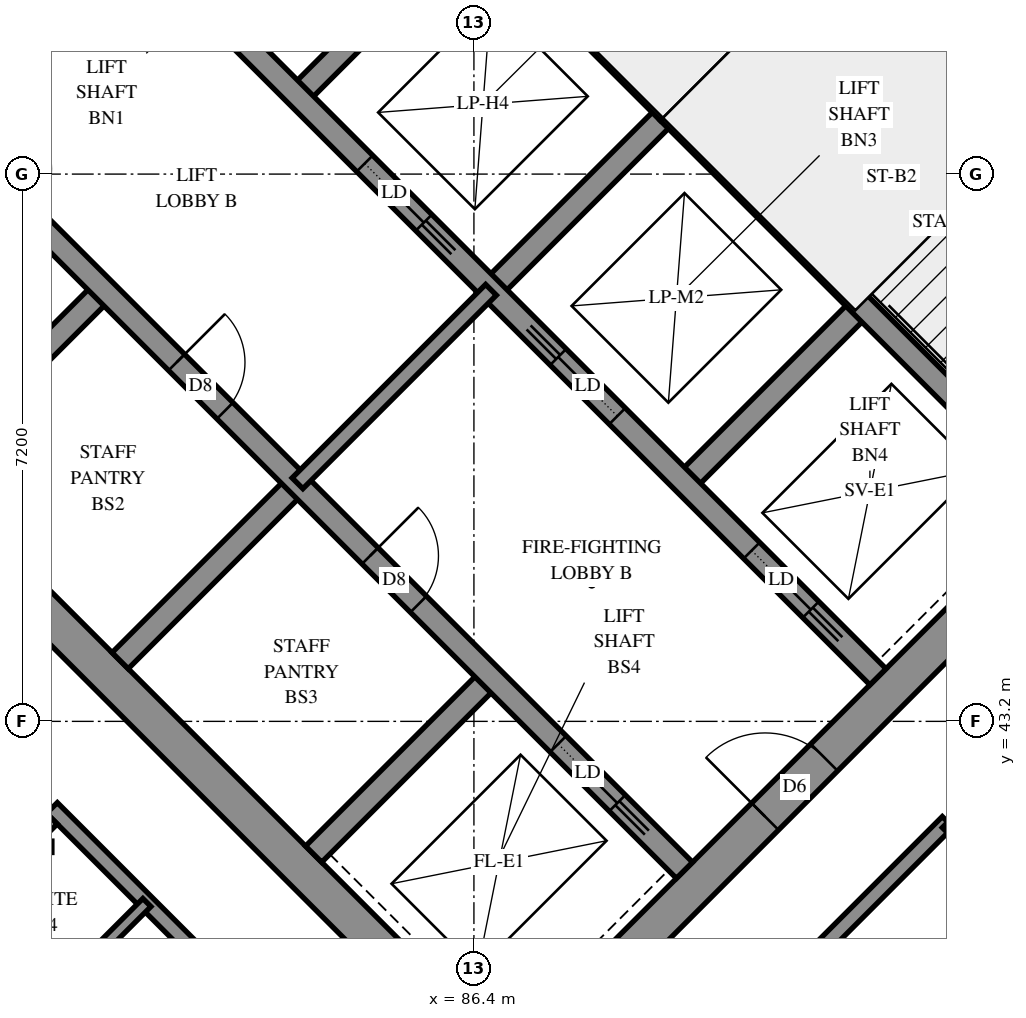
"""IFC4 building model, lengths in metres.
Left out: names, types, materials, properties, quantities, classifications, styles, units other than length and angle.
Written with IfcOpenShell. Run it as: python <this file> out.ifc"""

import sys

from ifc_helpers import new_model, si_unit, direction, frame, frame_2d, origin, place, context, subcontext, project, spatial, rectangle, extrude, element, fill, save


model = new_model("IFC4")
c1 = context("Model", 3, precision=1e-05, world=origin(), true_north=direction((0.0, 1.0)))
c2 = subcontext(c1, "Body", "Model", "MODEL_VIEW")
j1 = project(units=[si_unit("LENGTHUNIT", "METRE"), si_unit("PLANEANGLEUNIT", "RADIAN")], contexts=[c1])
p1 = place(None, origin())
s1 = spatial("IfcSite", under=j1, at=p1, CompositionType="ELEMENT")
p2 = place(p1, origin())
s2 = spatial("IfcBuilding", under=s1, at=p2, CompositionType="ELEMENT")
p3 = place(p2, frame((0.0, 0.0, 210.0)))
s3 = spatial("IfcBuildingStorey", under=s2, at=p3, CompositionType="ELEMENT", Elevation=210.0)
p4 = place(p3, frame((76.124, 49.267, -0.3), z_axis=(0.0, 0.0, 1.0), x_axis=(0.7071067812, -0.7071067812, 0.0)))
e1 = element("IfcWall", 1, at=p4, inside=s3, PredefinedType="SHEAR", context=c2, shape_type="SweptSolid", body=[
    extrude(rectangle(XDim=15.4, YDim=0.5, at=frame_2d((7.7, 0.0))), origin(), (0.0, 0.0, 1.0), 2.7),
])
p5 = place(p3, frame((86.66, 59.802, -0.3), z_axis=(0.0, 0.0, 1.0), x_axis=(0.7071067812, -0.7071067812, 0.0)))
e2 = element("IfcWall", 2, at=p5, inside=s3, PredefinedType="SHEAR", context=c2, shape_type="SweptSolid", body=[
    extrude(rectangle(XDim=15.4, YDim=0.5, at=frame_2d((7.7, 0.0))), origin(), (0.0, 0.0, 1.0), 2.7),
])
p6 = place(p5, frame((10.5, 0.0, 0.3)))
e3 = element("IfcOpeningElement", 3, at=p6, cuts=e2, PredefinedType="OPENING", context=c2, shape_type="SweptSolid", body=[
    extrude(rectangle(XDim=0.8, YDim=2.1, at=frame_2d((0.4, 1.05))), frame((0.0, 0.26, 0.0), z_axis=(0.0, -1.0, 0.0), x_axis=(1.0, 0.0, 0.0)), (0.0, 0.0, 1.0), 0.52),
])
p7 = place(p3, frame((76.478, 49.267, -0.3), z_axis=(0.0, 0.0, 1.0), x_axis=(0.7071067812, 0.7071067812, 0.0)))
e4 = element("IfcWall", 4, at=p7, inside=s3, PredefinedType="SHEAR", context=c2, shape_type="SweptSolid", body=[
    extrude(rectangle(XDim=14.4, YDim=0.5, at=frame_2d((7.2, 0.0))), origin(), (0.0, 0.0, 1.0), 2.7),
])
p8 = place(p7, frame((4.55, 0.0, 0.3)))
e5 = element("IfcOpeningElement", 5, at=p8, cuts=e4, PredefinedType="OPENING", context=c2, shape_type="SweptSolid", body=[
    extrude(rectangle(XDim=1.1, YDim=2.1, at=frame_2d((0.55, 1.05))), frame((0.0, 0.26, 0.0), z_axis=(0.0, -1.0, 0.0), x_axis=(1.0, 0.0, 0.0)), (0.0, 0.0, 1.0), 0.52),
])
p9 = place(p7, frame((11.35, 0.0, 0.3)))
e6 = element("IfcOpeningElement", 6, at=p9, cuts=e4, PredefinedType="OPENING", context=c2, shape_type="SweptSolid", body=[
    extrude(rectangle(XDim=1.1, YDim=2.1, at=frame_2d((0.55, 1.05))), frame((0.0, 0.26, 0.0), z_axis=(0.0, -1.0, 0.0), x_axis=(1.0, 0.0, 0.0)), (0.0, 0.0, 1.0), 0.52),
])
p10 = place(p3, frame((87.013, 38.731, -0.3), z_axis=(0.0, 0.0, 1.0), x_axis=(0.7071067812, 0.7071067812, 0.0)))
e7 = element("IfcWall", 7, at=p10, inside=s3, PredefinedType="SHEAR", context=c2, shape_type="SweptSolid", body=[
    extrude(rectangle(XDim=14.4, YDim=0.5, at=frame_2d((7.2, 0.0))), origin(), (0.0, 0.0, 1.0), 2.7),
])
p11 = place(p10, frame((4.55, 0.0, 0.3)))
e8 = element("IfcOpeningElement", 8, at=p11, cuts=e7, PredefinedType="OPENING", context=c2, shape_type="SweptSolid", body=[
    extrude(rectangle(XDim=1.1, YDim=2.1, at=frame_2d((0.55, 1.05))), frame((0.0, 0.26, 0.0), z_axis=(0.0, -1.0, 0.0), x_axis=(1.0, 0.0, 0.0)), (0.0, 0.0, 1.0), 0.52),
])
p12 = place(p10, frame((11.35, 0.0, 0.3)))
e9 = element("IfcOpeningElement", 9, at=p12, cuts=e7, PredefinedType="OPENING", context=c2, shape_type="SweptSolid", body=[
    extrude(rectangle(XDim=1.1, YDim=2.1, at=frame_2d((0.55, 1.05))), frame((0.0, 0.26, 0.0), z_axis=(0.0, -1.0, 0.0), x_axis=(1.0, 0.0, 0.0)), (0.0, 0.0, 1.0), 0.52),
])
for number, where, z_axis, x_axis in (
    (10, (79.2, 46.544, 0.0), (0.0, 0.0, 1.0), (0.707, 0.707, 0.0)),
    (11, (84.079, 51.423, 0.0), (0.0, 0.0, 1.0), (0.707, 0.707, 0.0)),
):
    element("IfcWall", number, at=place(p3, frame(where, z_axis=z_axis, x_axis=x_axis)), inside=s3, PredefinedType="SOLIDWALL", context=c2, shape_type="SweptSolid", body=[
        extrude(rectangle(XDim=3.3, YDim=0.3, at=frame_2d((1.65, 0.0))), origin(), (0.0, 0.0, 1.0), 3.1),
    ])
p13 = place(p3, frame((81.746, 43.999, 0.0), z_axis=(0.0, 0.0, 1.0), x_axis=(0.7071067812, 0.7071067812, 0.0)))
e12 = element("IfcWall", 12, at=p13, inside=s3, PredefinedType="SOLIDWALL", context=c2, shape_type="SweptSolid", body=[
    extrude(rectangle(XDim=3.3, YDim=0.3, at=frame_2d((1.65, 0.0))), origin(), (0.0, 0.0, 1.0), 3.1),
])
p14 = place(p3, frame((86.625, 48.878, 0.0), z_axis=(0.0, 0.0, 1.0), x_axis=(0.7071067812, 0.7071067812, 0.0)))
e13 = element("IfcWall", 13, at=p14, inside=s3, PredefinedType="SOLIDWALL", context=c2, shape_type="SweptSolid", body=[
    extrude(rectangle(XDim=3.3, YDim=0.3, at=frame_2d((1.65, 0.0))), origin(), (0.0, 0.0, 1.0), 3.1),
])
p15 = place(p3, frame((84.291, 41.453, 0.0), z_axis=(0.0, 0.0, 1.0), x_axis=(0.7071067812, 0.7071067812, 0.0)))
e14 = element("IfcWall", 14, at=p15, inside=s3, PredefinedType="SOLIDWALL", context=c2, shape_type="SweptSolid", body=[
    extrude(rectangle(XDim=3.3, YDim=0.3, at=frame_2d((1.65, 0.0))), origin(), (0.0, 0.0, 1.0), 3.1),
])
p16 = place(p3, frame((89.17, 46.332, 0.0), z_axis=(0.0, 0.0, 1.0), x_axis=(0.7071067812, 0.7071067812, 0.0)))
e15 = element("IfcWall", 15, at=p16, inside=s3, PredefinedType="SOLIDWALL", context=c2, shape_type="SweptSolid", body=[
    extrude(rectangle(XDim=3.3, YDim=0.3, at=frame_2d((1.65, 0.0))), origin(), (0.0, 0.0, 1.0), 3.1),
])
p17 = place(p3, frame((78.988, 51.423, 0.0), z_axis=(0.0, 0.0, 1.0), x_axis=(0.7071067812, -0.7071067812, 0.0)))
e16 = element("IfcWall", 16, at=p17, inside=s3, PredefinedType="SOLIDWALL", context=c2, shape_type="SweptSolid", body=[
    extrude(rectangle(XDim=14.4, YDim=0.3, at=frame_2d((7.2, 0.0))), origin(), (0.0, 0.0, 1.0), 3.1),
])
p18 = place(p17, frame((1.35, 0.0, 0.0)))
e17 = element("IfcOpeningElement", 17, at=p18, cuts=e16, PredefinedType="OPENING", context=c2, shape_type="SweptSolid", body=[
    extrude(rectangle(XDim=0.9, YDim=2.1, at=frame_2d((0.45, 1.05))), frame((0.0, 0.16, 0.0), z_axis=(0.0, -1.0, 0.0), x_axis=(1.0, 0.0, 0.0)), (0.0, 0.0, 1.0), 0.32),
])
p19 = place(p17, frame((4.95, 0.0, 0.0)))
e18 = element("IfcOpeningElement", 18, at=p19, cuts=e16, PredefinedType="OPENING", context=c2, shape_type="SweptSolid", body=[
    extrude(rectangle(XDim=0.9, YDim=2.1, at=frame_2d((0.45, 1.05))), frame((0.0, 0.16, 0.0), z_axis=(0.0, -1.0, 0.0), x_axis=(1.0, 0.0, 0.0)), (0.0, 0.0, 1.0), 0.32),
])
p20 = place(p17, frame((8.55, 0.0, 0.0)))
e19 = element("IfcOpeningElement", 19, at=p20, cuts=e16, PredefinedType="OPENING", context=c2, shape_type="SweptSolid", body=[
    extrude(rectangle(XDim=0.9, YDim=2.1, at=frame_2d((0.45, 1.05))), frame((0.0, 0.16, 0.0), z_axis=(0.0, -1.0, 0.0), x_axis=(1.0, 0.0, 0.0)), (0.0, 0.0, 1.0), 0.32),
])
p21 = place(p17, frame((12.05, 0.0, 0.0)))
e20 = element("IfcOpeningElement", 20, at=p21, cuts=e16, PredefinedType="OPENING", context=c2, shape_type="SweptSolid", body=[
    extrude(rectangle(XDim=1.1, YDim=2.1, at=frame_2d((0.55, 1.05))), frame((0.0, 0.16, 0.0), z_axis=(0.0, -1.0, 0.0), x_axis=(1.0, 0.0, 0.0)), (0.0, 0.0, 1.0), 0.32),
])
p22 = place(p3, frame((81.534, 53.969, 0.0), z_axis=(0.0, 0.0, 1.0), x_axis=(0.707103309, -0.7071102534, 0.0)))
e21 = element("IfcWall", 21, at=p22, inside=s3, PredefinedType="SOLIDWALL", context=c2, shape_type="SweptSolid", body=[
    extrude(rectangle(XDim=14.4, YDim=0.3, at=frame_2d((7.2, 0.0))), origin(), (0.0, 0.0, 1.0), 3.1),
])
p23 = place(p22, frame((1.25, 0.0, 0.0)))
e22 = element("IfcOpeningElement", 22, at=p23, cuts=e21, PredefinedType="OPENING", context=c2, shape_type="SweptSolid", body=[
    extrude(rectangle(XDim=1.1, YDim=2.1, at=frame_2d((0.55, 1.05))), frame((0.0, 0.16, 0.0), z_axis=(0.0, -1.0, 0.0), x_axis=(1.0, 0.0, 0.0)), (0.0, 0.0, 1.0), 0.32),
])
p24 = place(p22, frame((4.85, 0.0, 0.0)))
e23 = element("IfcOpeningElement", 23, at=p24, cuts=e21, PredefinedType="OPENING", context=c2, shape_type="SweptSolid", body=[
    extrude(rectangle(XDim=1.1, YDim=2.1, at=frame_2d((0.55, 1.05))), frame((0.0, 0.16, 0.0), z_axis=(0.0, -1.0, 0.0), x_axis=(1.0, 0.0, 0.0)), (0.0, 0.0, 1.0), 0.32),
])
p25 = place(p22, frame((8.45, 0.0, 0.0)))
e24 = element("IfcOpeningElement", 24, at=p25, cuts=e21, PredefinedType="OPENING", context=c2, shape_type="SweptSolid", body=[
    extrude(rectangle(XDim=1.1, YDim=2.1, at=frame_2d((0.55, 1.05))), frame((0.0, 0.16, 0.0), z_axis=(0.0, -1.0, 0.0), x_axis=(1.0, 0.0, 0.0)), (0.0, 0.0, 1.0), 0.32),
])
p26 = place(p22, frame((12.05, 0.0, 0.0)))
e25 = element("IfcOpeningElement", 25, at=p26, cuts=e21, PredefinedType="OPENING", context=c2, shape_type="SweptSolid", body=[
    extrude(rectangle(XDim=1.1, YDim=2.1, at=frame_2d((0.55, 1.05))), frame((0.0, 0.16, 0.0), z_axis=(0.0, -1.0, 0.0), x_axis=(1.0, 0.0, 0.0)), (0.0, 0.0, 1.0), 0.32),
])
for number, where, z_axis, x_axis in (
    (26, (83.867, 56.302, 0.0), (0.0, 0.0, 1.0), (0.707, -0.707, 0.0)),
    (27, (88.958, 51.211, 0.0), (0.0, 0.0, 1.0), (0.707, -0.707, 0.0)),
):
    element("IfcWall", number, at=place(p3, frame(where, z_axis=z_axis, x_axis=x_axis)), inside=s3, PredefinedType="SOLIDWALL", context=c2, shape_type="SweptSolid", body=[
        extrude(rectangle(XDim=7.2, YDim=0.3, at=frame_2d((3.6, 0.0))), origin(), (0.0, 0.0, 1.0), 3.1),
    ])
p27 = place(p3, frame((88.958, 51.211, 0.0), z_axis=(0.0, 0.0, 1.0), x_axis=(0.7071067812, 0.7071067812, 0.0)))
e28 = element("IfcWall", 28, at=p27, inside=s3, PredefinedType="SOLIDWALL", context=c2, shape_type="SweptSolid", body=[
    extrude(rectangle(XDim=4.2, YDim=0.3, at=frame_2d((2.1, 0.0))), origin(), (0.0, 0.0, 1.0), 3.1),
])
p28 = place(p3, frame((91.313, 53.354, 0.0), z_axis=(0.0, 0.0, 1.0), x_axis=(0.7071140275, -0.7070995348, 0.0)))
e29 = element("IfcWall", 29, at=p28, inside=s3, PredefinedType="PARTITIONING", context=c2, shape_type="SweptSolid", body=[
    extrude(rectangle(XDim=6.9, YDim=0.15, at=frame_2d((3.45, 0.0))), origin(), (0.0, 0.0, 1.0), 3.1),
])
p29 = place(p3, frame((84.079, 46.332, 0.0), z_axis=(0.0, 0.0, 1.0), x_axis=(0.7071067812, 0.7071067812, 0.0)))
e30 = element("IfcWall", 30, at=p29, inside=s3, PredefinedType="PARTITIONING", context=c2, shape_type="SweptSolid", body=[
    extrude(rectangle(XDim=3.6, YDim=0.2, at=frame_2d((1.8, 0.0))), origin(), (0.0, 0.0, 1.0), 3.1),
])
p30 = place(p3, frame((86.835, 36.079, 0.0), z_axis=(0.0, 0.0, 1.0), x_axis=(0.7071067812, 0.7071067812, 0.0)))
e31 = element("IfcWall", 31, at=p30, inside=s3, PredefinedType="PARTITIONING", context=c2, shape_type="SweptSolid", body=[
    extrude(rectangle(XDim=8.2, YDim=0.2, at=frame_2d((4.1, 0.0))), origin(), (0.0, 0.0, 1.0), 3.1),
])
p31 = place(p3, frame((80.849, 42.061, 0.0), z_axis=(0.0, 0.0, 1.0), x_axis=(0.7071067812, -0.7071067812, 0.0)))
e32 = element("IfcWall", 32, at=p31, inside=s3, PredefinedType="PARTITIONING", context=c2, shape_type="SweptSolid", body=[
    extrude(rectangle(XDim=6.964, YDim=0.2, at=frame_2d((3.482, 0.0))), origin(), (0.0, 0.0, 1.0), 3.1),
])
p32 = place(p31, frame((5.159, 0.0, 0.0)))
e33 = element("IfcOpeningElement", 33, at=p32, cuts=e32, PredefinedType="OPENING", context=c2, shape_type="SweptSolid", body=[
    extrude(rectangle(XDim=0.9, YDim=2.1, at=frame_2d((0.45, 1.05))), frame((0.0, 0.11, 0.0), z_axis=(0.0, -1.0, 0.0), x_axis=(1.0, 0.0, 0.0)), (0.0, 0.0, 1.0), 0.22),
])
p33 = place(p3, frame((92.633, 41.873, 0.0), z_axis=(0.0, 0.0, 1.0), x_axis=(0.7071067812, -0.7071067812, 0.0)))
e34 = element("IfcWall", 34, at=p33, inside=s3, PredefinedType="PARTITIONING", context=c2, shape_type="SweptSolid", body=[
    extrude(rectangle(XDim=5.199, YDim=0.2, at=frame_2d((2.599, 0.0))), origin(), (0.0, 0.0, 1.0), 3.1),
])
p34 = place(p33, frame((0.253, 0.0, 0.0)))
e35 = element("IfcOpeningElement", 35, at=p34, cuts=e34, PredefinedType="OPENING", context=c2, shape_type="SweptSolid", body=[
    extrude(rectangle(XDim=1.0, YDim=2.1, at=frame_2d((0.5, 1.05))), frame((0.0, 0.11, 0.0), z_axis=(0.0, -1.0, 0.0), x_axis=(1.0, 0.0, 0.0)), (0.0, 0.0, 1.0), 0.22),
])
p35 = place(p33, frame((3.948, 0.0, 0.0)))
e36 = element("IfcOpeningElement", 36, at=p35, cuts=e34, PredefinedType="OPENING", context=c2, shape_type="SweptSolid", body=[
    extrude(rectangle(XDim=0.9, YDim=2.1, at=frame_2d((0.45, 1.05))), frame((0.0, 0.11, 0.0), z_axis=(0.0, -1.0, 0.0), x_axis=(1.0, 0.0, 0.0)), (0.0, 0.0, 1.0), 0.22),
])
p36 = place(p3, frame((79.285, 38.005, 0.0), z_axis=(0.0, 0.0, 1.0), x_axis=(0.7070942078, 0.7071193543, 0.0)))
e37 = element("IfcWall", 37, at=p36, inside=s3, PredefinedType="PARTITIONING", context=c2, shape_type="SweptSolid", body=[
    extrude(rectangle(XDim=3.977, YDim=0.15, at=frame_2d((1.988, 0.0))), origin(), (0.0, 0.0, 1.0), 3.1),
])
p37 = place(p36, frame((1.836, 0.0, 0.0)))
e38 = element("IfcOpeningElement", 38, at=p37, cuts=e37, PredefinedType="OPENING", context=c2, shape_type="SweptSolid", body=[
    extrude(rectangle(XDim=0.8, YDim=2.1, at=frame_2d((0.4, 1.05))), frame((0.0, 0.085, 0.0), z_axis=(0.0, -1.0, 0.0), x_axis=(1.0, 0.0, 0.0)), (0.0, 0.0, 1.0), 0.17),
])
p38 = place(p3, frame((92.072, 39.046, 0.0), z_axis=(0.0, 0.0, 1.0), x_axis=(0.706689978, 0.7075233388, 0.0)))
e39 = element("IfcWall", 39, at=p38, inside=s3, PredefinedType="PARTITIONING", context=c2, shape_type="SweptSolid", body=[
    extrude(rectangle(XDim=2.4, YDim=0.15, at=frame_2d((1.2, 0.0))), origin(), (0.0, 0.0, 1.0), 3.1),
])
p39 = place(p3, frame((80.497, 42.129, 0.0), z_axis=(0.0, 0.0, 1.0), x_axis=(0.7071067812, -0.7071067812, 0.0)))
e40 = element("IfcWall", 40, at=p39, inside=s3, PredefinedType="PARTITIONING", context=c2, shape_type="SweptSolid", body=[
    extrude(rectangle(XDim=0.495, YDim=0.2, at=frame_2d((0.247, 0.0))), origin(), (0.0, 0.0, 1.0), 3.1),
])
p40 = place(p11, origin())
e41 = element("IfcDoor", 41, at=p40, inside=s3, OperationType="DOUBLE_DOOR_SINGLE_SWING", PredefinedType="DOOR", context=c2, shape_type="SweptSolid", body=[
    extrude(rectangle(XDim=1.1, YDim=2.1, at=frame_2d((0.55, 1.05))), frame((0.0, 0.025, 0.0), z_axis=(0.0, -1.0, 0.0), x_axis=(1.0, 0.0, 0.0)), (0.0, 0.0, 1.0), 0.05),
])
fill(e8, e41)
p41 = place(p19, origin())
e42 = element("IfcDoor", 42, at=p41, inside=s3, OperationType="SINGLE_SWING_LEFT", PredefinedType="DOOR", context=c2, shape_type="SweptSolid", body=[
    extrude(rectangle(XDim=0.9, YDim=2.1, at=frame_2d((0.45, 1.05))), frame((0.0, 0.025, 0.0), z_axis=(0.0, -1.0, 0.0), x_axis=(1.0, 0.0, 0.0)), (0.0, 0.0, 1.0), 0.05),
])
fill(e18, e42)
p42 = place(p20, origin())
e43 = element("IfcDoor", 43, at=p42, inside=s3, OperationType="SINGLE_SWING_LEFT", PredefinedType="DOOR", context=c2, shape_type="SweptSolid", body=[
    extrude(rectangle(XDim=0.9, YDim=2.1, at=frame_2d((0.45, 1.05))), frame((0.0, 0.025, 0.0), z_axis=(0.0, -1.0, 0.0), x_axis=(1.0, 0.0, 0.0)), (0.0, 0.0, 1.0), 0.05),
])
fill(e19, e43)
p43 = place(p21, origin())
e44 = element("IfcDoor", 44, at=p43, inside=s3, OperationType="SLIDING_TO_RIGHT", PredefinedType="DOOR", context=c2, shape_type="SweptSolid", body=[
    extrude(rectangle(XDim=1.1, YDim=2.1, at=frame_2d((0.55, 1.05))), frame((0.0, 0.025, 0.0), z_axis=(0.0, -1.0, 0.0), x_axis=(1.0, 0.0, 0.0)), (0.0, 0.0, 1.0), 0.05),
])
fill(e20, e44)
p44 = place(p24, origin())
e45 = element("IfcDoor", 45, at=p44, inside=s3, OperationType="SLIDING_TO_RIGHT", PredefinedType="DOOR", context=c2, shape_type="SweptSolid", body=[
    extrude(rectangle(XDim=1.1, YDim=2.1, at=frame_2d((0.55, 1.05))), frame((0.0, 0.025, 0.0), z_axis=(0.0, -1.0, 0.0), x_axis=(1.0, 0.0, 0.0)), (0.0, 0.0, 1.0), 0.05),
])
fill(e23, e45)
p45 = place(p25, origin())
e46 = element("IfcDoor", 46, at=p45, inside=s3, OperationType="SLIDING_TO_LEFT", PredefinedType="DOOR", context=c2, shape_type="SweptSolid", body=[
    extrude(rectangle(XDim=1.1, YDim=2.1, at=frame_2d((0.55, 1.05))), frame((0.0, 0.025, 0.0), z_axis=(0.0, -1.0, 0.0), x_axis=(1.0, 0.0, 0.0)), (0.0, 0.0, 1.0), 0.05),
])
fill(e24, e46)
p46 = place(p26, origin())
e47 = element("IfcDoor", 47, at=p46, inside=s3, OperationType="SLIDING_TO_RIGHT", PredefinedType="DOOR", context=c2, shape_type="SweptSolid", body=[
    extrude(rectangle(XDim=1.1, YDim=2.1, at=frame_2d((0.55, 1.05))), frame((0.0, 0.025, 0.0), z_axis=(0.0, -1.0, 0.0), x_axis=(1.0, 0.0, 0.0)), (0.0, 0.0, 1.0), 0.05),
])
fill(e25, e47)
save(model, sys.argv[1])
